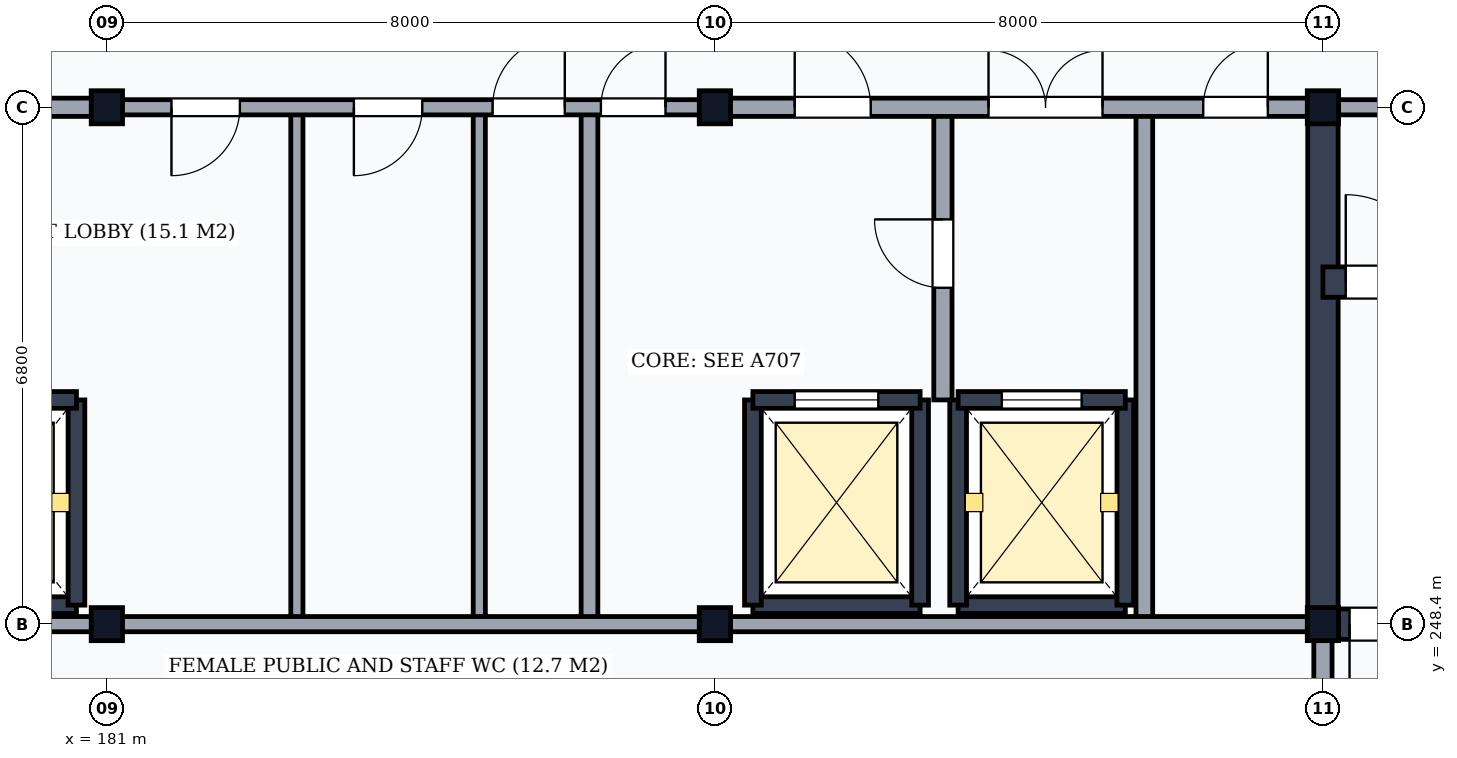
"""IFC4 building model, lengths in metres.
Left out: names, types, materials, properties, quantities, classifications, styles, units other than length and angle.
Written with IfcOpenShell. Run it as: python <this file> out.ifc"""

import sys

from ifc_helpers import new_model, si_unit, direction, frame, frame_2d, origin, origin_2d, place, context, subcontext, project, spatial, rectangle, i_section, extrude, element, fill, save


model = new_model("IFC4")
c1 = context("Model", 3, precision=1e-05, world=origin(), true_north=direction((0.0, 1.0)))
c2 = subcontext(c1, "Body", "Model", "MODEL_VIEW")
j1 = project(units=[si_unit("LENGTHUNIT", "METRE"), si_unit("PLANEANGLEUNIT", "RADIAN")], contexts=[c1])
p1 = place(None, origin())
s1 = spatial("IfcSite", under=j1, at=p1, CompositionType="ELEMENT")
p2 = place(p1, origin())
s2 = spatial("IfcBuilding", under=s1, at=p2, CompositionType="ELEMENT")
p3 = place(p2, origin())
s3 = spatial("IfcBuildingStorey", under=s2, at=p3, CompositionType="ELEMENT", Elevation=0.0)
for number, where, z_axis, x_axis in (
    (1, (181.0, 248.4, 0.0), (0.0, 0.0, 1.0), (1.0, 0.0, 0.0)),
    (2, (181.0, 255.2, 0.0), (0.0, 0.0, 1.0), (1.0, 0.0, 0.0)),
    (3, (189.0, 248.4, 0.0), (0.0, 0.0, 1.0), (1.0, 0.0, 0.0)),
    (4, (189.0, 255.2, 0.0), (0.0, 0.0, 1.0), (1.0, 0.0, 0.0)),
    (5, (197.0, 248.4, 0.0), (0.0, 0.0, 1.0), (1.0, 0.0, 0.0)),
    (6, (197.0, 255.2, 0.0), (0.0, 0.0, 1.0), (1.0, 0.0, 0.0)),
):
    element("IfcColumn", number, at=place(p3, frame(where, z_axis=z_axis, x_axis=x_axis)), inside=s3, PredefinedType="COLUMN", context=c2, shape_type="SweptSolid", body=[
        extrude(i_section(OverallWidth=0.412, OverallDepth=0.435, WebThickness=0.036, FlangeThickness=0.057, FilletRadius=0.015, at=origin_2d()), origin(), (0.0, 0.0, 1.0), 5.4),
    ])
p4 = place(p3, frame((197.0, 248.4, 0.0), z_axis=(0.0, 0.0, 1.0), x_axis=(1.0, 0.0, 0.0)))
e7 = element("IfcWall", 7, at=p4, inside=s3, PredefinedType="SHEAR", context=c2, shape_type="SweptSolid", body=[
    extrude(rectangle(XDim=8.0, YDim=0.4, at=frame_2d((4.0, 0.0))), origin(), (0.0, 0.0, 1.0), 5.14),
])
p5 = place(p4, frame((0.35, 0.0, 0.0)))
e8 = element("IfcOpeningElement", 8, at=p5, cuts=e7, PredefinedType="OPENING", context=c2, shape_type="SweptSolid", body=[
    extrude(rectangle(XDim=1.15, YDim=2.15, at=frame_2d((0.575, 1.075))), frame((0.0, 0.215, 0.0), z_axis=(0.0, -1.0, 0.0), x_axis=(1.0, 0.0, 0.0)), (0.0, 0.0, 1.0), 0.43),
])
p6 = place(p3, frame((197.0, 248.4, 0.0), z_axis=(0.0, 0.0, 1.0), x_axis=(0.0, 1.0, 0.0)))
e9 = element("IfcWall", 9, at=p6, inside=s3, PredefinedType="SHEAR", context=c2, shape_type="SweptSolid", body=[
    extrude(rectangle(XDim=6.8, YDim=0.4, at=frame_2d((3.4, 0.0))), origin(), (0.0, 0.0, 1.0), 5.14),
])
p7 = place(p3, frame((197.0, 252.9, 0.0), z_axis=(0.0, 0.0, 1.0), x_axis=(1.0, 0.0, 0.0)))
e10 = element("IfcWall", 10, at=p7, inside=s3, PredefinedType="SHEAR", context=c2, shape_type="SweptSolid", body=[
    extrude(rectangle(XDim=8.0, YDim=0.4, at=frame_2d((4.0, 0.0))), origin(), (0.0, 0.0, 1.0), 5.14),
])
p8 = place(p7, frame((0.3, 0.0, 0.0)))
e11 = element("IfcOpeningElement", 11, at=p8, cuts=e10, PredefinedType="OPENING", context=c2, shape_type="SweptSolid", body=[
    extrude(rectangle(XDim=1.15, YDim=2.15, at=frame_2d((0.575, 1.075))), frame((0.0, 0.215, 0.0), z_axis=(0.0, -1.0, 0.0), x_axis=(1.0, 0.0, 0.0)), (0.0, 0.0, 1.0), 0.43),
])
p9 = place(p3, frame((197.0, 255.2, 0.0), z_axis=(0.0, 0.0, 1.0), x_axis=(1.0, 0.0, 0.0)))
e12 = element("IfcWall", 12, at=p9, inside=s3, PredefinedType="PARTITIONING", context=c2, shape_type="SweptSolid", body=[
    extrude(rectangle(XDim=8.0, YDim=0.2, at=frame_2d((4.0, 0.0))), origin(), (0.0, 0.0, 1.0), 4.638),
])
p10 = place(p9, frame((3.275, 0.0, 0.0)))
e13 = element("IfcOpeningElement", 13, at=p10, cuts=e12, PredefinedType="OPENING", context=c2, shape_type="SweptSolid", body=[
    extrude(rectangle(XDim=1.45, YDim=2.2, at=frame_2d((0.725, 1.1))), frame((0.0, 0.115, 0.0), z_axis=(0.0, -1.0, 0.0), x_axis=(1.0, 0.0, 0.0)), (0.0, 0.0, 1.0), 0.23),
])
p11 = place(p3, frame((178.4, 248.65, 0.0), z_axis=(0.0, 0.0, 1.0), x_axis=(1.0, 0.0, 0.0)))
e14 = element("IfcWall", 14, at=p11, inside=s3, PredefinedType="SHEAR", context=c2, shape_type="SweptSolid", body=[
    extrude(rectangle(XDim=2.2, YDim=0.22, at=frame_2d((1.1, 0.0))), origin(), (0.0, 0.0, 1.0), 5.14),
])
p12 = place(p3, frame((180.6, 248.65, 0.0), z_axis=(0.0, 0.0, 1.0), x_axis=(0.0, 1.0, 0.0)))
e15 = element("IfcWall", 15, at=p12, inside=s3, PredefinedType="SHEAR", context=c2, shape_type="SweptSolid", body=[
    extrude(rectangle(XDim=2.7, YDim=0.22, at=frame_2d((1.35, 0.0))), origin(), (0.0, 0.0, 1.0), 5.14),
])
p13 = place(p3, frame((178.4, 251.35, 0.0), z_axis=(0.0, 0.0, 1.0), x_axis=(1.0, 0.0, 0.0)))
e16 = element("IfcWall", 16, at=p13, inside=s3, PredefinedType="SHEAR", context=c2, shape_type="SweptSolid", body=[
    extrude(rectangle(XDim=2.2, YDim=0.22, at=frame_2d((1.1, 0.0))), origin(), (0.0, 0.0, 1.0), 5.14),
])
p14 = place(p13, frame((0.575, 0.0, 0.0)))
e17 = element("IfcOpeningElement", 17, at=p14, cuts=e16, PredefinedType="OPENING", context=c2, shape_type="SweptSolid", body=[
    extrude(rectangle(XDim=1.05, YDim=2.15, at=frame_2d((0.525, 1.075))), frame((0.0, 0.125, 0.0), z_axis=(0.0, -1.0, 0.0), x_axis=(1.0, 0.0, 0.0)), (0.0, 0.0, 1.0), 0.25),
])
p15 = place(p3, frame((189.5, 248.65, 0.0), z_axis=(0.0, 0.0, 1.0), x_axis=(1.0, 0.0, 0.0)))
e18 = element("IfcWall", 18, at=p15, inside=s3, PredefinedType="SHEAR", context=c2, shape_type="SweptSolid", body=[
    extrude(rectangle(XDim=2.2, YDim=0.22, at=frame_2d((1.1, 0.0))), origin(), (0.0, 0.0, 1.0), 5.14),
])
for number, where, z_axis, x_axis in (
    (19, (189.5, 248.65, 0.0), (0.0, 0.0, 1.0), (0.0, 1.0, 0.0)),
    (20, (191.7, 248.65, 0.0), (0.0, 0.0, 1.0), (0.0, 1.0, 0.0)),
):
    element("IfcWall", number, at=place(p3, frame(where, z_axis=z_axis, x_axis=x_axis)), inside=s3, PredefinedType="SHEAR", context=c2, shape_type="SweptSolid", body=[
        extrude(rectangle(XDim=2.7, YDim=0.22, at=frame_2d((1.35, 0.0))), origin(), (0.0, 0.0, 1.0), 5.14),
    ])
p16 = place(p3, frame((189.5, 251.35, 0.0), z_axis=(0.0, 0.0, 1.0), x_axis=(1.0, 0.0, 0.0)))
e21 = element("IfcWall", 21, at=p16, inside=s3, PredefinedType="SHEAR", context=c2, shape_type="SweptSolid", body=[
    extrude(rectangle(XDim=2.2, YDim=0.22, at=frame_2d((1.1, 0.0))), origin(), (0.0, 0.0, 1.0), 5.14),
])
p17 = place(p16, frame((0.55, 0.0, 0.0)))
e22 = element("IfcOpeningElement", 22, at=p17, cuts=e21, PredefinedType="OPENING", context=c2, shape_type="SweptSolid", body=[
    extrude(rectangle(XDim=1.1, YDim=2.15, at=frame_2d((0.55, 1.075))), frame((0.0, 0.125, 0.0), z_axis=(0.0, -1.0, 0.0), x_axis=(1.0, 0.0, 0.0)), (0.0, 0.0, 1.0), 0.25),
])
p18 = place(p3, frame((192.2, 248.65, 0.0), z_axis=(0.0, 0.0, 1.0), x_axis=(1.0, 0.0, 0.0)))
e23 = element("IfcWall", 23, at=p18, inside=s3, PredefinedType="SHEAR", context=c2, shape_type="SweptSolid", body=[
    extrude(rectangle(XDim=2.2, YDim=0.22, at=frame_2d((1.1, 0.0))), origin(), (0.0, 0.0, 1.0), 5.14),
])
for number, where, z_axis, x_axis in (
    (24, (192.2, 248.65, 0.0), (0.0, 0.0, 1.0), (0.0, 1.0, 0.0)),
    (25, (194.4, 248.65, 0.0), (0.0, 0.0, 1.0), (0.0, 1.0, 0.0)),
):
    element("IfcWall", number, at=place(p3, frame(where, z_axis=z_axis, x_axis=x_axis)), inside=s3, PredefinedType="SHEAR", context=c2, shape_type="SweptSolid", body=[
        extrude(rectangle(XDim=2.7, YDim=0.22, at=frame_2d((1.35, 0.0))), origin(), (0.0, 0.0, 1.0), 5.14),
    ])
p19 = place(p3, frame((192.2, 251.35, 0.0), z_axis=(0.0, 0.0, 1.0), x_axis=(1.0, 0.0, 0.0)))
e26 = element("IfcWall", 26, at=p19, inside=s3, PredefinedType="SHEAR", context=c2, shape_type="SweptSolid", body=[
    extrude(rectangle(XDim=2.2, YDim=0.22, at=frame_2d((1.1, 0.0))), origin(), (0.0, 0.0, 1.0), 5.14),
])
p20 = place(p19, frame((0.575, 0.0, 0.0)))
e27 = element("IfcOpeningElement", 27, at=p20, cuts=e26, PredefinedType="OPENING", context=c2, shape_type="SweptSolid", body=[
    extrude(rectangle(XDim=1.05, YDim=2.15, at=frame_2d((0.525, 1.075))), frame((0.0, 0.125, 0.0), z_axis=(0.0, -1.0, 0.0), x_axis=(1.0, 0.0, 0.0)), (0.0, 0.0, 1.0), 0.25),
])
p21 = place(p3, frame((192.0, 251.35, 0.0), z_axis=(0.0, 0.0, 1.0), x_axis=(0.0, 1.0, 0.0)))
e28 = element("IfcWall", 28, at=p21, inside=s3, PredefinedType="PARTITIONING", context=c2, shape_type="SweptSolid", body=[
    extrude(rectangle(XDim=3.85, YDim=0.24, at=frame_2d((1.925, 0.0))), origin(), (0.0, 0.0, 1.0), 5.14),
])
p22 = place(p21, frame((1.475, 0.0, 0.0)))
e29 = element("IfcOpeningElement", 29, at=p22, cuts=e28, PredefinedType="OPENING", context=c2, shape_type="SweptSolid", body=[
    extrude(rectangle(XDim=0.9, YDim=2.1, at=frame_2d((0.45, 1.05))), frame((0.0, 0.135, 0.0), z_axis=(0.0, -1.0, 0.0), x_axis=(1.0, 0.0, 0.0)), (0.0, 0.0, 1.0), 0.27),
])
p23 = place(p3, frame((194.65, 248.4, 0.0), z_axis=(0.0, 0.0, 1.0), x_axis=(0.0, 1.0, 0.0)))
e30 = element("IfcWall", 30, at=p23, inside=s3, PredefinedType="PARTITIONING", context=c2, shape_type="SweptSolid", body=[
    extrude(rectangle(XDim=6.8, YDim=0.22, at=frame_2d((3.4, 0.0))), origin(), (0.0, 0.0, 1.0), 5.14),
])
for number, where, z_axis, x_axis in (
    (31, (183.5, 248.4, 0.0), (0.0, 0.0, 1.0), (0.0, 1.0, 0.0)),
    (32, (185.9, 248.4, 0.0), (0.0, 0.0, 1.0), (0.0, 1.0, 0.0)),
):
    element("IfcWall", number, at=place(p3, frame(where, z_axis=z_axis, x_axis=x_axis)), inside=s3, PredefinedType="PARTITIONING", context=c2, shape_type="SweptSolid", body=[
        extrude(rectangle(XDim=6.8, YDim=0.16, at=frame_2d((3.4, 0.0))), origin(), (0.0, 0.0, 1.0), 5.14),
    ])
p24 = place(p3, frame((187.35, 248.4, 0.0), z_axis=(0.0, 0.0, 1.0), x_axis=(0.0, 1.0, 0.0)))
e33 = element("IfcWall", 33, at=p24, inside=s3, PredefinedType="PARTITIONING", context=c2, shape_type="SweptSolid", body=[
    extrude(rectangle(XDim=6.8, YDim=0.22, at=frame_2d((3.4, 0.0))), origin(), (0.0, 0.0, 1.0), 5.14),
])
p25 = place(p3, frame((181.0, 248.4, 0.0), z_axis=(0.0, 0.0, 1.0), x_axis=(1.0, 0.0, 0.0)))
e34 = element("IfcWall", 34, at=p25, inside=s3, PredefinedType="PARTITIONING", context=c2, shape_type="SweptSolid", body=[
    extrude(rectangle(XDim=8.0, YDim=0.2, at=frame_2d((4.0, 0.0))), origin(), (0.0, 0.0, 1.0), 4.638),
])
p26 = place(p3, frame((173.0, 255.2, 0.0), z_axis=(0.0, 0.0, 1.0), x_axis=(1.0, 0.0, 0.0)))
e35 = element("IfcWall", 35, at=p26, inside=s3, PredefinedType="PARTITIONING", context=c2, shape_type="SweptSolid", body=[
    extrude(rectangle(XDim=8.0, YDim=0.24, at=frame_2d((4.0, 0.0))), origin(), (0.0, 0.0, 1.0), 4.638),
])
p27 = place(p26, frame((1.05, 0.0, 0.0)))
e36 = element("IfcOpeningElement", 36, at=p27, cuts=e35, PredefinedType="OPENING", context=c2, shape_type="SweptSolid", body=[
    extrude(rectangle(XDim=1.0, YDim=2.1, at=frame_2d((0.5, 1.05))), frame((0.0, 0.135, 0.0), z_axis=(0.0, -1.0, 0.0), x_axis=(1.0, 0.0, 0.0)), (0.0, 0.0, 1.0), 0.27),
])
p28 = place(p26, frame((4.6, 0.0, 0.0)))
e37 = element("IfcOpeningElement", 37, at=p28, cuts=e35, PredefinedType="OPENING", context=c2, shape_type="SweptSolid", body=[
    extrude(rectangle(XDim=1.6, YDim=2.25, at=frame_2d((0.8, 1.125))), frame((0.0, 0.135, 0.0), z_axis=(0.0, -1.0, 0.0), x_axis=(1.0, 0.0, 0.0)), (0.0, 0.0, 1.0), 0.27),
])
p29 = place(p3, frame((181.0, 255.2, 0.0), z_axis=(0.0, 0.0, 1.0), x_axis=(1.0, 0.0, 0.0)))
e38 = element("IfcWall", 38, at=p29, inside=s3, PredefinedType="PARTITIONING", context=c2, shape_type="SweptSolid", body=[
    extrude(rectangle(XDim=8.0, YDim=0.2, at=frame_2d((4.0, 0.0))), origin(), (0.0, 0.0, 1.0), 4.638),
])
p30 = place(p29, frame((0.85, 0.0, 0.0)))
e39 = element("IfcOpeningElement", 39, at=p30, cuts=e38, PredefinedType="OPENING", context=c2, shape_type="SweptSolid", body=[
    extrude(rectangle(XDim=0.9, YDim=2.1, at=frame_2d((0.45, 1.05))), frame((0.0, 0.115, 0.0), z_axis=(0.0, -1.0, 0.0), x_axis=(1.0, 0.0, 0.0)), (0.0, 0.0, 1.0), 0.23),
])
p31 = place(p29, frame((3.25, 0.0, 0.0)))
e40 = element("IfcOpeningElement", 40, at=p31, cuts=e38, PredefinedType="OPENING", context=c2, shape_type="SweptSolid", body=[
    extrude(rectangle(XDim=0.9, YDim=2.1, at=frame_2d((0.45, 1.05))), frame((0.0, 0.115, 0.0), z_axis=(0.0, -1.0, 0.0), x_axis=(1.0, 0.0, 0.0)), (0.0, 0.0, 1.0), 0.23),
])
p32 = place(p29, frame((5.075, 0.0, 0.0)))
e41 = element("IfcOpeningElement", 41, at=p32, cuts=e38, PredefinedType="OPENING", context=c2, shape_type="SweptSolid", body=[
    extrude(rectangle(XDim=0.95, YDim=2.1, at=frame_2d((0.475, 1.05))), frame((0.0, 0.115, 0.0), z_axis=(0.0, -1.0, 0.0), x_axis=(1.0, 0.0, 0.0)), (0.0, 0.0, 1.0), 0.23),
])
p33 = place(p29, frame((6.5, 0.0, 0.0)))
e42 = element("IfcOpeningElement", 42, at=p33, cuts=e38, PredefinedType="OPENING", context=c2, shape_type="SweptSolid", body=[
    extrude(rectangle(XDim=0.85, YDim=2.1, at=frame_2d((0.425, 1.05))), frame((0.0, 0.115, 0.0), z_axis=(0.0, -1.0, 0.0), x_axis=(1.0, 0.0, 0.0)), (0.0, 0.0, 1.0), 0.23),
])
p34 = place(p3, frame((189.0, 255.2, 0.0), z_axis=(0.0, 0.0, 1.0), x_axis=(1.0, 0.0, 0.0)))
e43 = element("IfcWall", 43, at=p34, inside=s3, PredefinedType="PARTITIONING", context=c2, shape_type="SweptSolid", body=[
    extrude(rectangle(XDim=8.0, YDim=0.24, at=frame_2d((4.0, 0.0))), origin(), (0.0, 0.0, 1.0), 4.638),
])
p35 = place(p34, frame((1.05, 0.0, 0.0)))
e44 = element("IfcOpeningElement", 44, at=p35, cuts=e43, PredefinedType="OPENING", context=c2, shape_type="SweptSolid", body=[
    extrude(rectangle(XDim=1.0, YDim=2.1, at=frame_2d((0.5, 1.05))), frame((0.0, 0.135, 0.0), z_axis=(0.0, -1.0, 0.0), x_axis=(1.0, 0.0, 0.0)), (0.0, 0.0, 1.0), 0.27),
])
p36 = place(p34, frame((3.6, 0.0, 0.0)))
e45 = element("IfcOpeningElement", 45, at=p36, cuts=e43, PredefinedType="OPENING", context=c2, shape_type="SweptSolid", body=[
    extrude(rectangle(XDim=1.5, YDim=2.25, at=frame_2d((0.75, 1.125))), frame((0.0, 0.135, 0.0), z_axis=(0.0, -1.0, 0.0), x_axis=(1.0, 0.0, 0.0)), (0.0, 0.0, 1.0), 0.27),
])
p37 = place(p34, frame((6.425, 0.0, 0.0)))
e46 = element("IfcOpeningElement", 46, at=p37, cuts=e43, PredefinedType="OPENING", context=c2, shape_type="SweptSolid", body=[
    extrude(rectangle(XDim=0.85, YDim=2.1, at=frame_2d((0.425, 1.05))), frame((0.0, 0.135, 0.0), z_axis=(0.0, -1.0, 0.0), x_axis=(1.0, 0.0, 0.0)), (0.0, 0.0, 1.0), 0.27),
])
p38 = place(p3, frame((197.0, 240.0, 0.0), z_axis=(0.0, 0.0, 1.0), x_axis=(0.0, 1.0, 0.0)))
e47 = element("IfcWall", 47, at=p38, inside=s3, PredefinedType="PARTITIONING", context=c2, shape_type="SweptSolid", body=[
    extrude(rectangle(XDim=8.4, YDim=0.24, at=frame_2d((4.2, 0.0))), origin(), (0.0, 0.0, 1.0), 4.688),
])
p39 = place(p38, frame((3.45, 0.0, 0.0)))
e48 = element("IfcOpeningElement", 48, at=p39, cuts=e47, PredefinedType="OPENING", context=c2, shape_type="SweptSolid", body=[
    extrude(rectangle(XDim=1.5, YDim=2.1, at=frame_2d((0.75, 1.05))), frame((0.0, 0.135, 0.0), z_axis=(0.0, -1.0, 0.0), x_axis=(1.0, 0.0, 0.0)), (0.0, 0.0, 1.0), 0.27),
])
for number, where, z_axis, x_axis in (
    (49, (173.0, 248.4, 0.0), (0.0, 0.0, 1.0), (1.0, 0.0, 0.0)),
    (50, (189.0, 248.4, 0.0), (0.0, 0.0, 1.0), (1.0, 0.0, 0.0)),
):
    element("IfcWall", number, at=place(p3, frame(where, z_axis=z_axis, x_axis=x_axis)), inside=s3, PredefinedType="PARTITIONING", context=c2, shape_type="SweptSolid", body=[
        extrude(rectangle(XDim=8.0, YDim=0.2, at=frame_2d((4.0, 0.0))), origin(), (0.0, 0.0, 1.0), 4.638),
    ])
p40 = place(p8, origin())
e51 = element("IfcDoor", 51, at=p40, inside=s3, OperationType="SINGLE_SWING_LEFT", PredefinedType="DOOR", context=c2, shape_type="SweptSolid", body=[
    extrude(rectangle(XDim=1.15, YDim=2.15, at=frame_2d((0.575, 1.075))), frame((0.0, 0.025, 0.0), z_axis=(0.0, -1.0, 0.0), x_axis=(1.0, 0.0, 0.0)), (0.0, 0.0, 1.0), 0.05),
])
fill(e11, e51)
p41 = place(p5, frame((1.15, 0.0, 0.0), z_axis=(0.0, 0.0, 1.0), x_axis=(-1.0, 0.0, 0.0)))
e52 = element("IfcDoor", 52, at=p41, inside=s3, OperationType="SINGLE_SWING_RIGHT", PredefinedType="DOOR", context=c2, shape_type="SweptSolid", body=[
    extrude(rectangle(XDim=1.15, YDim=2.15, at=frame_2d((0.575, 1.075))), frame((0.0, 0.025, 0.0), z_axis=(0.0, -1.0, 0.0), x_axis=(1.0, 0.0, 0.0)), (0.0, 0.0, 1.0), 0.05),
])
fill(e8, e52)
p42 = place(p17, origin())
e53 = element("IfcDoor", 53, at=p42, inside=s3, OperationType="DOUBLE_DOOR_SLIDING", PredefinedType="USERDEFINED", context=c2, shape_type="SweptSolid", body=[
    extrude(rectangle(XDim=1.1, YDim=2.15, at=frame_2d((0.55, 1.075))), frame((0.0, 0.025, 0.0), z_axis=(0.0, -1.0, 0.0), x_axis=(1.0, 0.0, 0.0)), (0.0, 0.0, 1.0), 0.05),
])
fill(e22, e53)
p43 = place(p20, origin())
e54 = element("IfcDoor", 54, at=p43, inside=s3, OperationType="DOUBLE_DOOR_SLIDING", PredefinedType="USERDEFINED", context=c2, shape_type="SweptSolid", body=[
    extrude(rectangle(XDim=1.05, YDim=2.15, at=frame_2d((0.525, 1.075))), frame((0.0, 0.025, 0.0), z_axis=(0.0, -1.0, 0.0), x_axis=(1.0, 0.0, 0.0)), (0.0, 0.0, 1.0), 0.05),
])
fill(e27, e54)
p44 = place(p22, frame((0.9, 0.0, 0.0), z_axis=(0.0, 0.0, 1.0), x_axis=(-1.0, 0.0, 0.0)))
e55 = element("IfcDoor", 55, at=p44, inside=s3, OperationType="SINGLE_SWING_LEFT", PredefinedType="DOOR", context=c2, shape_type="SweptSolid", body=[
    extrude(rectangle(XDim=0.9, YDim=2.1, at=frame_2d((0.45, 1.05))), frame((0.0, 0.025, 0.0), z_axis=(0.0, -1.0, 0.0), x_axis=(1.0, 0.0, 0.0)), (0.0, 0.0, 1.0), 0.05),
])
fill(e29, e55)
p45 = place(p30, frame((0.9, 0.0, 0.0), z_axis=(0.0, 0.0, 1.0), x_axis=(-1.0, 0.0, 0.0)))
e56 = element("IfcDoor", 56, at=p45, inside=s3, OperationType="SINGLE_SWING_RIGHT", PredefinedType="DOOR", context=c2, shape_type="SweptSolid", body=[
    extrude(rectangle(XDim=0.9, YDim=2.1, at=frame_2d((0.45, 1.05))), frame((0.0, 0.025, 0.0), z_axis=(0.0, -1.0, 0.0), x_axis=(1.0, 0.0, 0.0)), (0.0, 0.0, 1.0), 0.05),
])
fill(e39, e56)
p46 = place(p31, frame((0.9, 0.0, 0.0), z_axis=(0.0, 0.0, 1.0), x_axis=(-1.0, 0.0, 0.0)))
e57 = element("IfcDoor", 57, at=p46, inside=s3, OperationType="SINGLE_SWING_RIGHT", PredefinedType="DOOR", context=c2, shape_type="SweptSolid", body=[
    extrude(rectangle(XDim=0.9, YDim=2.1, at=frame_2d((0.45, 1.05))), frame((0.0, 0.025, 0.0), z_axis=(0.0, -1.0, 0.0), x_axis=(1.0, 0.0, 0.0)), (0.0, 0.0, 1.0), 0.05),
])
fill(e40, e57)
p47 = place(p32, frame((0.95, 0.0, 0.0), z_axis=(0.0, 0.0, 1.0), x_axis=(-1.0, 0.0, 0.0)))
e58 = element("IfcDoor", 58, at=p47, inside=s3, OperationType="SINGLE_SWING_LEFT", PredefinedType="DOOR", context=c2, shape_type="SweptSolid", body=[
    extrude(rectangle(XDim=0.95, YDim=2.1, at=frame_2d((0.475, 1.05))), frame((0.0, 0.025, 0.0), z_axis=(0.0, -1.0, 0.0), x_axis=(1.0, 0.0, 0.0)), (0.0, 0.0, 1.0), 0.05),
])
fill(e41, e58)
p48 = place(p33, frame((0.85, 0.0, 0.0), z_axis=(0.0, 0.0, 1.0), x_axis=(-1.0, 0.0, 0.0)))
e59 = element("IfcDoor", 59, at=p48, inside=s3, OperationType="SINGLE_SWING_LEFT", PredefinedType="DOOR", context=c2, shape_type="SweptSolid", body=[
    extrude(rectangle(XDim=0.85, YDim=2.1, at=frame_2d((0.425, 1.05))), frame((0.0, 0.025, 0.0), z_axis=(0.0, -1.0, 0.0), x_axis=(1.0, 0.0, 0.0)), (0.0, 0.0, 1.0), 0.05),
])
fill(e42, e59)
p49 = place(p35, origin())
e60 = element("IfcDoor", 60, at=p49, inside=s3, OperationType="SINGLE_SWING_LEFT", PredefinedType="DOOR", context=c2, shape_type="SweptSolid", body=[
    extrude(rectangle(XDim=1.0, YDim=2.1, at=frame_2d((0.5, 1.05))), frame((0.0, 0.025, 0.0), z_axis=(0.0, -1.0, 0.0), x_axis=(1.0, 0.0, 0.0)), (0.0, 0.0, 1.0), 0.05),
])
fill(e44, e60)
p50 = place(p36, origin())
e61 = element("IfcDoor", 61, at=p50, inside=s3, OperationType="DOUBLE_DOOR_SINGLE_SWING", PredefinedType="DOOR", context=c2, shape_type="SweptSolid", body=[
    extrude(rectangle(XDim=1.5, YDim=2.25, at=frame_2d((0.75, 1.125))), frame((0.0, 0.025, 0.0), z_axis=(0.0, -1.0, 0.0), x_axis=(1.0, 0.0, 0.0)), (0.0, 0.0, 1.0), 0.05),
])
fill(e45, e61)
p51 = place(p37, frame((0.85, 0.0, 0.0), z_axis=(0.0, 0.0, 1.0), x_axis=(-1.0, 0.0, 0.0)))
e62 = element("IfcDoor", 62, at=p51, inside=s3, OperationType="SINGLE_SWING_LEFT", PredefinedType="DOOR", context=c2, shape_type="SweptSolid", body=[
    extrude(rectangle(XDim=0.85, YDim=2.1, at=frame_2d((0.425, 1.05))), frame((0.0, 0.025, 0.0), z_axis=(0.0, -1.0, 0.0), x_axis=(1.0, 0.0, 0.0)), (0.0, 0.0, 1.0), 0.05),
])
fill(e46, e62)
save(model, sys.argv[1])
